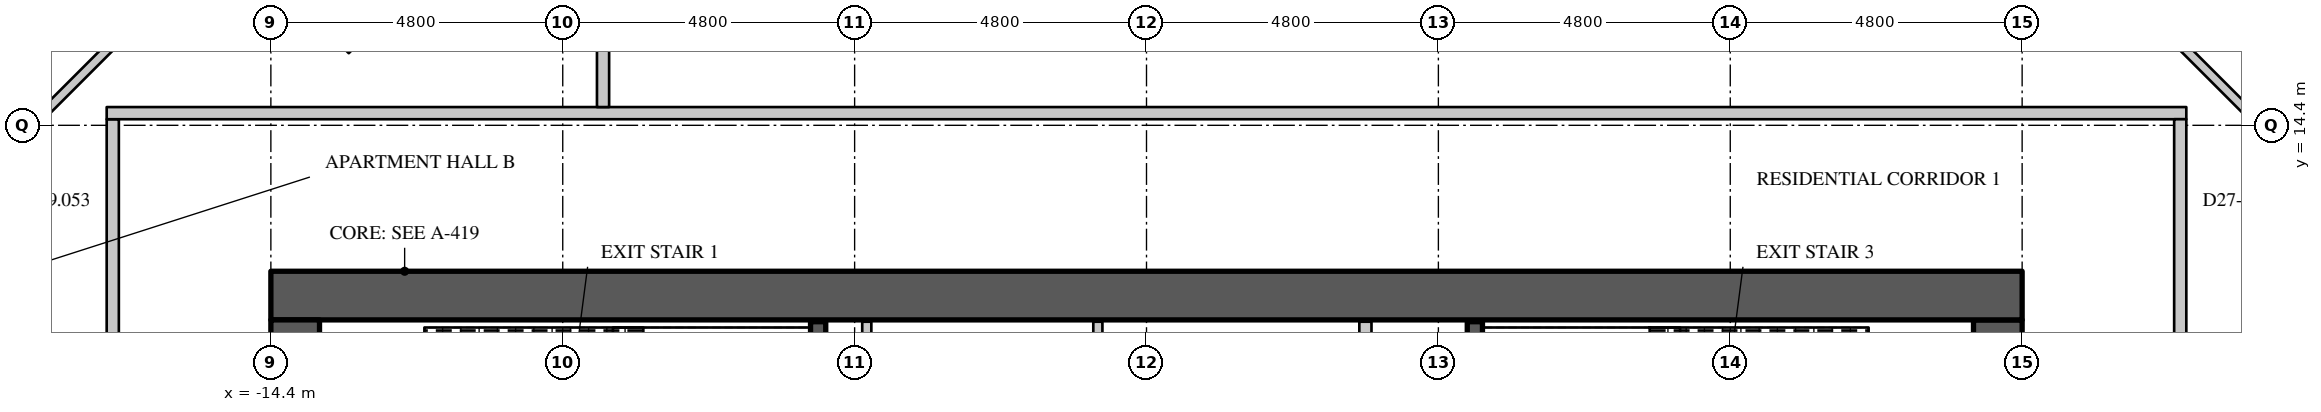
"""IFC4 building model, lengths in metres.
Left out: names, types, materials, properties, quantities, classifications, styles, units other than length and angle.
Written with IfcOpenShell. Run it as: python <this file> out.ifc"""

import sys

from ifc_helpers import new_model, si_unit, direction, frame, frame_2d, origin, place, context, subcontext, project, spatial, rectangle, extrude, element, save


model = new_model("IFC4")
c1 = context("Model", 3, precision=1e-05, world=origin(), true_north=direction((0.0, 1.0)))
c2 = subcontext(c1, "Body", "Model", "MODEL_VIEW")
j1 = project(units=[si_unit("LENGTHUNIT", "METRE"), si_unit("PLANEANGLEUNIT", "RADIAN")], contexts=[c1])
p1 = place(None, origin())
s1 = spatial("IfcSite", under=j1, at=p1, CompositionType="ELEMENT")
p2 = place(p1, origin())
s2 = spatial("IfcBuilding", under=s1, at=p2, CompositionType="ELEMENT")
p3 = place(p2, frame((0.0, 0.0, 119.1)))
s3 = spatial("IfcBuildingStorey", under=s2, at=p3, CompositionType="ELEMENT", Elevation=119.1)
p4 = place(p3, frame((-14.4, 11.6, 0.0), z_axis=(0.0, 0.0, 1.0), x_axis=(1.0, 0.0, 0.0)))
e1 = element("IfcWall", 1, at=p4, inside=s3, PredefinedType="SHEAR", context=c2, shape_type="SweptSolid", body=[
    extrude(rectangle(XDim=28.8, YDim=0.8, at=frame_2d((14.4, 0.0))), origin(), (0.0, 0.0, 1.0), 4.2),
])
p5 = place(p3, frame((14.0, -11.2, 0.0), z_axis=(0.0, 0.0, 1.0), x_axis=(0.0, 1.0, 0.0)))
e2 = element("IfcWall", 2, at=p5, inside=s3, PredefinedType="SHEAR", context=c2, shape_type="SweptSolid", body=[
    extrude(rectangle(XDim=22.4, YDim=0.8, at=frame_2d((11.2, 0.0))), origin(), (0.0, 0.0, 1.0), 4.2),
])
p6 = place(p5, frame((20.25, 0.0, 0.0)))
e3 = element("IfcOpeningElement", 3, at=p6, cuts=e2, PredefinedType="OPENING", context=c2, shape_type="SweptSolid", body=[
    extrude(rectangle(XDim=1.1, YDim=2.2, at=frame_2d((0.55, 1.1))), frame((0.0, 0.41, 0.0), z_axis=(0.0, -1.0, 0.0), x_axis=(1.0, 0.0, 0.0)), (0.0, 0.0, 1.0), 0.82),
])
p7 = place(p5, frame((1.05, 0.0, 0.0)))
e4 = element("IfcOpeningElement", 4, at=p7, cuts=e2, PredefinedType="OPENING", context=c2, shape_type="SweptSolid", body=[
    extrude(rectangle(XDim=1.1, YDim=2.2, at=frame_2d((0.55, 1.1))), frame((0.0, 0.41, 0.0), z_axis=(0.0, -1.0, 0.0), x_axis=(1.0, 0.0, 0.0)), (0.0, 0.0, 1.0), 0.82),
])
p8 = place(p5, frame((14.75, 0.0, 0.0)))
e5 = element("IfcOpeningElement", 5, at=p8, cuts=e2, PredefinedType="OPENING", context=c2, shape_type="SweptSolid", body=[
    extrude(rectangle(XDim=1.5, YDim=2.4, at=frame_2d((0.75, 1.2))), frame((0.0, 0.41, 0.0), z_axis=(0.0, -1.0, 0.0), x_axis=(1.0, 0.0, 0.0)), (0.0, 0.0, 1.0), 0.82),
])
p9 = place(p5, frame((6.15, 0.0, 0.0)))
e6 = element("IfcOpeningElement", 6, at=p9, cuts=e2, PredefinedType="OPENING", context=c2, shape_type="SweptSolid", body=[
    extrude(rectangle(XDim=1.5, YDim=2.4, at=frame_2d((0.75, 1.2))), frame((0.0, 0.41, 0.0), z_axis=(0.0, -1.0, 0.0), x_axis=(1.0, 0.0, 0.0)), (0.0, 0.0, 1.0), 0.82),
])
p10 = place(p3, frame((-14.0, -11.2, 0.0), z_axis=(0.0, 0.0, 1.0), x_axis=(0.0, 1.0, 0.0)))
e7 = element("IfcWall", 7, at=p10, inside=s3, PredefinedType="SHEAR", context=c2, shape_type="SweptSolid", body=[
    extrude(rectangle(XDim=22.4, YDim=0.8, at=frame_2d((11.2, 0.0))), origin(), (0.0, 0.0, 1.0), 4.2),
])
p11 = place(p10, frame((20.25, 0.0, 0.0)))
e8 = element("IfcOpeningElement", 8, at=p11, cuts=e7, PredefinedType="OPENING", context=c2, shape_type="SweptSolid", body=[
    extrude(rectangle(XDim=1.1, YDim=2.2, at=frame_2d((0.55, 1.1))), frame((0.0, 0.41, 0.0), z_axis=(0.0, -1.0, 0.0), x_axis=(1.0, 0.0, 0.0)), (0.0, 0.0, 1.0), 0.82),
])
p12 = place(p10, frame((1.05, 0.0, 0.0)))
e9 = element("IfcOpeningElement", 9, at=p12, cuts=e7, PredefinedType="OPENING", context=c2, shape_type="SweptSolid", body=[
    extrude(rectangle(XDim=1.1, YDim=2.2, at=frame_2d((0.55, 1.1))), frame((0.0, 0.41, 0.0), z_axis=(0.0, -1.0, 0.0), x_axis=(1.0, 0.0, 0.0)), (0.0, 0.0, 1.0), 0.82),
])
p13 = place(p10, frame((15.95, 0.0, 0.0)))
e10 = element("IfcOpeningElement", 10, at=p13, cuts=e7, PredefinedType="OPENING", context=c2, shape_type="SweptSolid", body=[
    extrude(rectangle(XDim=1.5, YDim=2.4, at=frame_2d((0.75, 1.2))), frame((0.0, 0.41, 0.0), z_axis=(0.0, -1.0, 0.0), x_axis=(1.0, 0.0, 0.0)), (0.0, 0.0, 1.0), 0.82),
])
p14 = place(p10, frame((4.95, 0.0, 0.0)))
e11 = element("IfcOpeningElement", 11, at=p14, cuts=e7, PredefinedType="OPENING", context=c2, shape_type="SweptSolid", body=[
    extrude(rectangle(XDim=1.5, YDim=2.4, at=frame_2d((0.75, 1.2))), frame((0.0, 0.41, 0.0), z_axis=(0.0, -1.0, 0.0), x_axis=(1.0, 0.0, 0.0)), (0.0, 0.0, 1.0), 0.82),
])
p15 = place(p3, frame((-17.0, -14.5, 0.0), z_axis=(0.0, 0.0, 1.0), x_axis=(0.0, 1.0, 0.0)))
e12 = element("IfcWall", 12, at=p15, inside=s3, PredefinedType="PARTITIONING", context=c2, shape_type="SweptSolid", body=[
    extrude(rectangle(XDim=29.0, YDim=0.2, at=frame_2d((14.5, 0.0))), origin(), (0.0, 0.0, 1.0), 3.95),
])
p16 = place(p15, frame((14.3, 0.0, 0.0)))
e13 = element("IfcOpeningElement", 13, at=p16, cuts=e12, PredefinedType="OPENING", context=c2, shape_type="SweptSolid", body=[
    extrude(rectangle(XDim=1.1, YDim=2.4, at=frame_2d((0.55, 1.2))), frame((0.0, 0.11, 0.0), z_axis=(0.0, -1.0, 0.0), x_axis=(1.0, 0.0, 0.0)), (0.0, 0.0, 1.0), 0.22),
])
p17 = place(p3, frame((-17.1, 14.6, 0.0), z_axis=(0.0, 0.0, 1.0), x_axis=(1.0, 0.0, 0.0)))
e14 = element("IfcWall", 14, at=p17, inside=s3, PredefinedType="PARTITIONING", context=c2, shape_type="SweptSolid", body=[
    extrude(rectangle(XDim=34.2, YDim=0.2, at=frame_2d((17.1, 0.0))), origin(), (0.0, 0.0, 1.0), 3.95),
])
p18 = place(p3, frame((17.0, -14.5, 0.0), z_axis=(0.0, 0.0, 1.0), x_axis=(0.0, 1.0, 0.0)))
e15 = element("IfcWall", 15, at=p18, inside=s3, PredefinedType="PARTITIONING", context=c2, shape_type="SweptSolid", body=[
    extrude(rectangle(XDim=29.0, YDim=0.2, at=frame_2d((14.5, 0.0))), origin(), (0.0, 0.0, 1.0), 3.95),
])
p19 = place(p18, frame((16.5, 0.0, 0.0)))
e16 = element("IfcOpeningElement", 16, at=p19, cuts=e15, PredefinedType="OPENING", context=c2, shape_type="SweptSolid", body=[
    extrude(rectangle(XDim=1.1, YDim=2.4, at=frame_2d((0.55, 1.2))), frame((0.0, 0.11, 0.0), z_axis=(0.0, -1.0, 0.0), x_axis=(1.0, 0.0, 0.0)), (0.0, 0.0, 1.0), 0.22),
])
p20 = place(p3, frame((-19.563, 13.172, 0.0), z_axis=(0.0, 0.0, 1.0), x_axis=(0.707106781187, 0.707106781187, 0.0)))
e17 = element("IfcWall", 17, at=p20, inside=s3, PredefinedType="PARTITIONING", context=c2, shape_type="SweptSolid", body=[
    extrude(rectangle(XDim=4.444, YDim=0.15, at=frame_2d((2.222, 0.0))), origin(), (0.0, 0.0, 1.0), 3.95),
])
p21 = place(p20, frame((0.25, 0.0, 0.0)))
e18 = element("IfcOpeningElement", 18, at=p21, cuts=e17, PredefinedType="OPENING", context=c2, shape_type="SweptSolid", body=[
    extrude(rectangle(XDim=0.95, YDim=2.2, at=frame_2d((0.475, 1.1))), frame((0.0, 0.085, 0.0), z_axis=(0.0, -1.0, 0.0), x_axis=(1.0, 0.0, 0.0)), (0.0, 0.0, 1.0), 0.17),
])
for number, where, z_axis, x_axis in (
    (19, (-4.6, 5.9, 0.0), (0.0, 0.0, 1.0), (0.0, 1.0, 0.0)),
    (20, (-0.8, 5.9, 0.0), (0.0, 0.0, 1.0), (0.0, 1.0, 0.0)),
):
    element("IfcWall", number, at=place(p3, frame(where, z_axis=z_axis, x_axis=x_axis)), inside=s3, PredefinedType="PARTITIONING", context=c2, shape_type="SweptSolid", body=[
        extrude(rectangle(XDim=5.27, YDim=0.15, at=frame_2d((2.635, 0.0))), origin(), (0.0, 0.0, 1.0), 3.95),
    ])
p22 = place(p3, frame((16.42, 16.314, 0.0), z_axis=(0.0, 0.0, 1.0), x_axis=(0.707106781187, -0.707106781187, 0.0)))
e21 = element("IfcWall", 21, at=p22, inside=s3, PredefinedType="PARTITIONING", context=c2, shape_type="SweptSolid", body=[
    extrude(rectangle(XDim=4.444, YDim=0.15, at=frame_2d((2.222, 0.0))), origin(), (0.0, 0.0, 1.0), 3.95),
])
p23 = place(p22, frame((3.25, 0.0, 0.0)))
e22 = element("IfcOpeningElement", 22, at=p23, cuts=e21, PredefinedType="OPENING", context=c2, shape_type="SweptSolid", body=[
    extrude(rectangle(XDim=0.95, YDim=2.2, at=frame_2d((0.475, 1.1))), frame((0.0, 0.085, 0.0), z_axis=(0.0, -1.0, 0.0), x_axis=(1.0, 0.0, 0.0)), (0.0, 0.0, 1.0), 0.17),
])
p24 = place(p3, frame((-8.937, 14.7, 0.0), z_axis=(0.0, 0.0, 1.0), x_axis=(0.0, 1.0, 0.0)))
e23 = element("IfcWall", 23, at=p24, inside=s3, PredefinedType="PARTITIONING", context=c2, shape_type="SweptSolid", body=[
    extrude(rectangle(XDim=11.755, YDim=0.2, at=frame_2d((5.877, 0.0))), origin(), (0.0, 0.0, 1.0), 3.95),
])
p25 = place(p3, frame((3.6, 5.9, 0.0), z_axis=(0.0, 0.0, 1.0), x_axis=(0.0, 1.0, 0.0)))
e24 = element("IfcWall", 24, at=p25, inside=s3, PredefinedType="PARTITIONING", context=c2, shape_type="SweptSolid", body=[
    extrude(rectangle(XDim=5.27, YDim=0.2, at=frame_2d((2.635, 0.0))), origin(), (0.0, 0.0, 1.0), 3.95),
])
for number, where, z_axis, x_axis in (
    (25, (-5.4, 8.325, 0.0), (0.0, 0.0, 1.0), (0.0, 1.0, 0.0)),
    (26, (5.4, 8.325, 0.0), (0.0, 0.0, 1.0), (0.0, 1.0, 0.0)),
):
    element("IfcWall", number, at=place(p3, frame(where, z_axis=z_axis, x_axis=x_axis)), inside=s3, PredefinedType="SHEAR", context=c2, shape_type="SweptSolid", body=[
        extrude(rectangle(XDim=2.845, YDim=0.25, at=frame_2d((1.422, 0.0))), origin(), (0.0, 0.0, 1.0), 3.95),
    ])
p26 = place(p3, frame((-14.781, 17.318, 0.0), z_axis=(0.0, 0.0, 1.0), x_axis=(0.707106781187, -0.707106781187, 0.0)))
e27 = element("IfcWall", 27, at=p26, inside=s3, PredefinedType="PARTITIONING", context=c2, shape_type="SweptSolid", body=[
    extrude(rectangle(XDim=2.4, YDim=0.1, at=frame_2d((1.2, 0.0))), origin(), (0.0, 0.0, 1.0), 3.95),
])
save(model, sys.argv[1])
